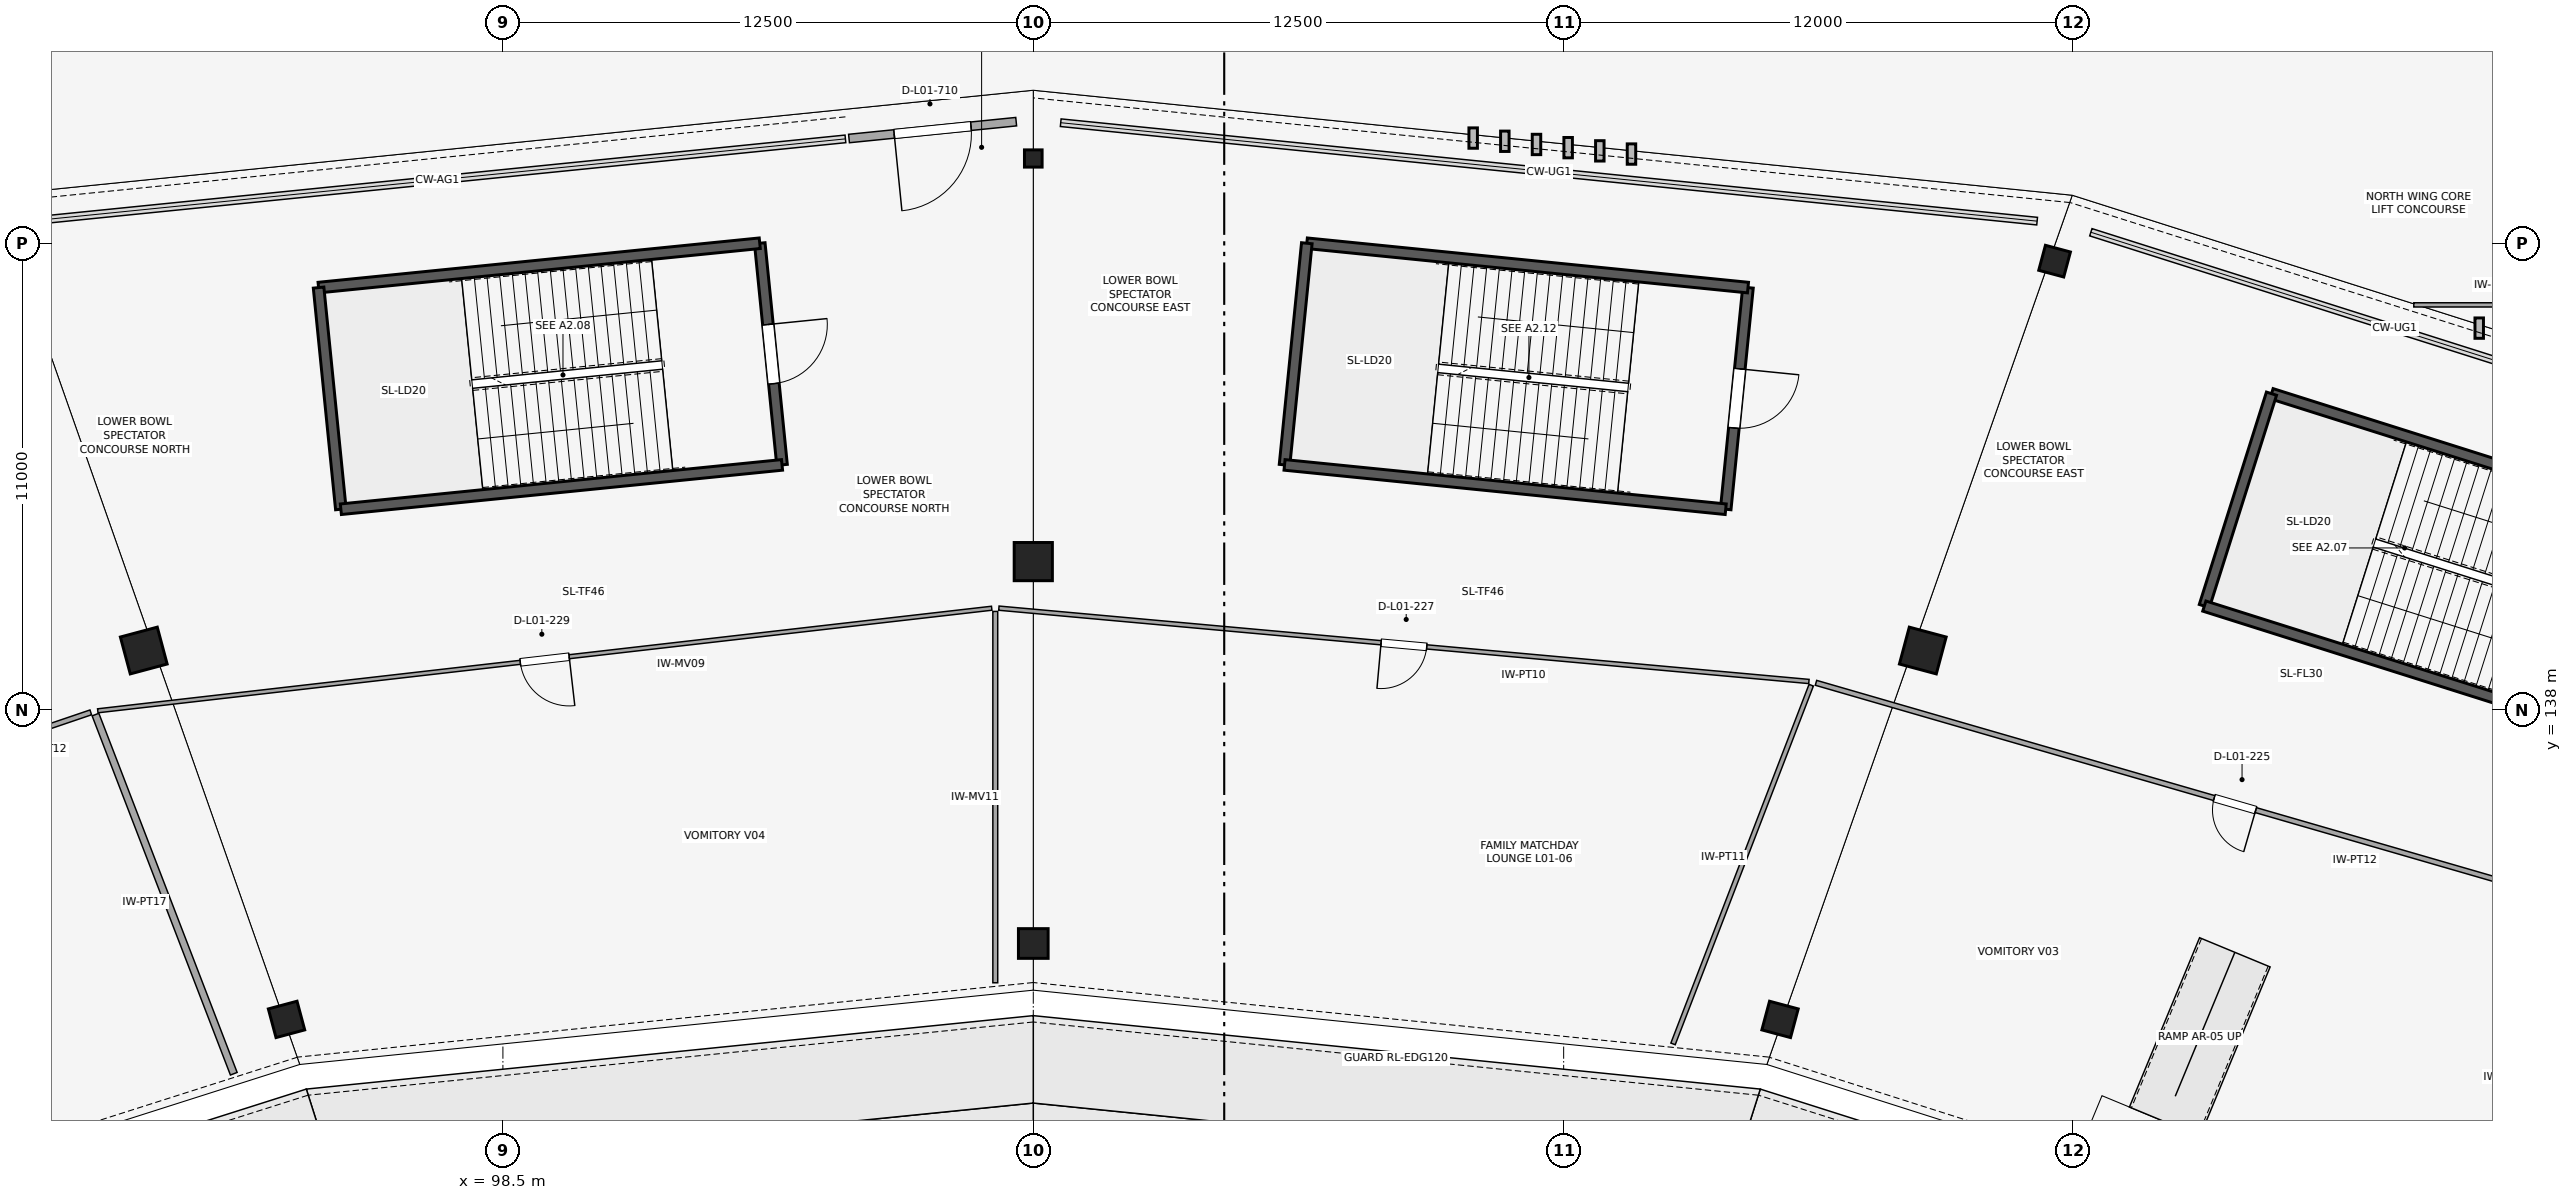
"""IFC4 building model, lengths in metres.
Left out: names, types, materials, properties, quantities, classifications, styles, units other than length and angle.
Written with IfcOpenShell. Run it as: python <this file> out.ifc"""

import sys

from ifc_helpers import new_model, si_unit, direction, frame, frame_2d, origin, origin_2d, place, context, subcontext, project, spatial, rectangle, hollow_circle, i_section, extrude, element, fill, save


model = new_model("IFC4")
c1 = context("Model", 3, precision=1e-05, world=origin(), true_north=direction((0.0, 1.0)))
c2 = subcontext(c1, "Body", "Model", "MODEL_VIEW")
j1 = project(units=[si_unit("LENGTHUNIT", "METRE"), si_unit("PLANEANGLEUNIT", "RADIAN")], contexts=[c1])
p1 = place(None, origin())
s1 = spatial("IfcSite", under=j1, at=p1, CompositionType="ELEMENT")
p2 = place(p1, origin())
s2 = spatial("IfcBuilding", under=s1, at=p2, CompositionType="ELEMENT")
p3 = place(p2, frame((0.0, 0.0, 5.4)))
s3 = spatial("IfcBuildingStorey", under=s2, at=p3, CompositionType="ELEMENT", Elevation=5.4)
for number, where, z_axis, x_axis in (
    (1, (128.6, 130.711, 0.0), (0.0, 0.0, 1.0), (0.259, 0.966, 0.0)),
    (2, (111.0, 132.5, 0.0), (0.0, 0.0, 1.0), (0.0, 1.0, 0.0)),
    (3, (93.4, 130.711, 0.0), (0.0, 0.0, 1.0), (-0.259, 0.966, 0.0)),
):
    element("IfcColumn", number, at=place(p3, frame(where, z_axis=z_axis, x_axis=x_axis)), inside=s3, PredefinedType="COLUMN", context=c2, shape_type="SweptSolid", body=[
        extrude(rectangle(XDim=0.7, YDim=0.7, at=origin_2d()), origin(), (0.0, 0.0, 1.0), 5.2),
    ])
p4 = place(p3, frame((131.964, 139.404, 0.0), z_axis=(0.0, 0.0, 1.0), x_axis=(0.258819045103, 0.965925826289, 0.0)))
e4 = element("IfcColumn", 4, at=p4, inside=s3, PredefinedType="COLUMN", context=c2, shape_type="SweptSolid", body=[
    extrude(rectangle(XDim=0.9, YDim=0.9, at=origin_2d()), origin(), (0.0, 0.0, 1.0), 5.2),
])
p5 = place(p3, frame((111.0, 141.5, 0.0), z_axis=(0.0, 0.0, 1.0), x_axis=(0.0, 1.0, 0.0)))
e5 = element("IfcColumn", 5, at=p5, inside=s3, PredefinedType="COLUMN", context=c2, shape_type="SweptSolid", body=[
    extrude(rectangle(XDim=0.9, YDim=0.9, at=origin_2d()), origin(), (0.0, 0.0, 1.0), 4.92),
])
p6 = place(p3, frame((90.036, 139.404, 0.0), z_axis=(0.0, 0.0, 1.0), x_axis=(-0.258819045103, 0.965925826289, 0.0)))
e6 = element("IfcColumn", 6, at=p6, inside=s3, PredefinedType="COLUMN", context=c2, shape_type="SweptSolid", body=[
    extrude(rectangle(XDim=0.9, YDim=0.9, at=origin_2d()), origin(), (0.0, 0.0, 1.0), 5.2),
])
p7 = place(p3, frame((135.07, 148.581, 0.0), z_axis=(0.0, 0.0, 1.0), x_axis=(0.258819045103, 0.965925826289, 0.0)))
e7 = element("IfcColumn", 7, at=p7, inside=s3, PredefinedType="COLUMN", context=c2, shape_type="SweptSolid", body=[
    extrude(hollow_circle(Radius=0.305, WallThickness=0.03, at=origin_2d()), origin(), (0.0, 0.0, 1.0), 5.2),
])
p8 = place(p3, frame((111.0, 151.0, 0.0), z_axis=(0.0, 0.0, 1.0), x_axis=(0.0, 1.0, 0.0)))
e8 = element("IfcColumn", 8, at=p8, inside=s3, PredefinedType="PILASTER", context=c2, shape_type="SweptSolid", body=[
    extrude(i_section(OverallWidth=0.406, OverallDepth=0.416, WebThickness=0.024, FlangeThickness=0.039, FilletRadius=0.015, at=origin_2d()), origin(), (0.0, 0.0, 1.0), 4.92),
])
p9 = place(p3, frame((150.146, 142.307, 0.0), z_axis=(0.0, 0.0, 1.0), x_axis=(-0.953461834254, 0.301513732061, 0.0)))
e9 = element("IfcWall", 9, at=p9, inside=s3, PredefinedType="SHEAR", context=c2, shape_type="SweptSolid", body=[
    extrude(rectangle(XDim=10.45, YDim=0.25, at=frame_2d((5.225, 0.0))), origin(), (0.0, 0.0, 1.0), 4.92),
])
p10 = place(p3, frame((140.182, 145.458, 0.0), z_axis=(0.0, 0.0, 1.0), x_axis=(-0.301485222482, -0.953470849384, 0.0)))
e10 = element("IfcWall", 10, at=p10, inside=s3, PredefinedType="SHEAR", context=c2, shape_type="SweptSolid", body=[
    extrude(rectangle(XDim=5.25, YDim=0.25, at=frame_2d((2.625, 0.0))), origin(), (0.0, 0.0, 1.0), 4.92),
])
p11 = place(p3, frame((138.6, 140.452, 0.0), z_axis=(0.0, 0.0, 1.0), x_axis=(0.953459710305, -0.301520448438, 0.0)))
e11 = element("IfcWall", 11, at=p11, inside=s3, PredefinedType="SHEAR", context=c2, shape_type="SweptSolid", body=[
    extrude(rectangle(XDim=10.45, YDim=0.25, at=frame_2d((5.225, 0.0))), origin(), (0.0, 0.0, 1.0), 4.92),
])
p12 = place(p3, frame((105.079, 143.779, 0.0), z_axis=(0.0, 0.0, 1.0), x_axis=(-0.100028593886, 0.994984562898, 0.0)))
e12 = element("IfcWall", 12, at=p12, inside=s3, PredefinedType="SHEAR", context=c2, shape_type="SweptSolid", body=[
    extrude(rectangle(XDim=5.25, YDim=0.25, at=frame_2d((2.625, 0.0))), origin(), (0.0, 0.0, 1.0), 4.92),
])
p13 = place(p12, frame((1.925, 0.0, 0.0)))
e13 = element("IfcOpeningElement", 13, at=p13, cuts=e12, PredefinedType="OPENING", context=c2, shape_type="SweptSolid", body=[
    extrude(rectangle(XDim=1.4, YDim=2.2, at=frame_2d((0.7, 1.1))), frame((0.0, 0.135, 0.0), z_axis=(0.0, -1.0, 0.0), x_axis=(1.0, 0.0, 0.0)), (0.0, 0.0, 1.0), 0.27),
])
p14 = place(p3, frame((104.553, 149.003, 0.0), z_axis=(0.0, 0.0, 1.0), x_axis=(-0.994985938948, -0.100014905366, 0.0)))
e14 = element("IfcWall", 14, at=p14, inside=s3, PredefinedType="SHEAR", context=c2, shape_type="SweptSolid", body=[
    extrude(rectangle(XDim=10.45, YDim=0.25, at=frame_2d((5.225, 0.0))), origin(), (0.0, 0.0, 1.0), 4.92),
])
p15 = place(p3, frame((94.156, 147.958, 0.0), z_axis=(0.0, 0.0, 1.0), x_axis=(0.100028593886, -0.994984562898, 0.0)))
e15 = element("IfcWall", 15, at=p15, inside=s3, PredefinedType="SHEAR", context=c2, shape_type="SweptSolid", body=[
    extrude(rectangle(XDim=5.25, YDim=0.25, at=frame_2d((2.625, 0.0))), origin(), (0.0, 0.0, 1.0), 4.92),
])
p16 = place(p3, frame((94.681, 142.734, 0.0), z_axis=(0.0, 0.0, 1.0), x_axis=(0.994985938948, 0.100014905366, 0.0)))
e16 = element("IfcWall", 16, at=p16, inside=s3, PredefinedType="SHEAR", context=c2, shape_type="SweptSolid", body=[
    extrude(rectangle(XDim=10.45, YDim=0.25, at=frame_2d((5.225, 0.0))), origin(), (0.0, 0.0, 1.0), 4.92),
])
p17 = place(p3, frame((127.319, 142.734, 0.0), z_axis=(0.0, 0.0, 1.0), x_axis=(0.10002396577, 0.994985028165, 0.0)))
e17 = element("IfcWall", 17, at=p17, inside=s3, PredefinedType="SHEAR", context=c2, shape_type="SweptSolid", body=[
    extrude(rectangle(XDim=5.25, YDim=0.25, at=frame_2d((2.625, 0.0))), origin(), (0.0, 0.0, 1.0), 4.92),
])
p18 = place(p17, frame((1.925, 0.0, 0.0)))
e18 = element("IfcOpeningElement", 18, at=p18, cuts=e17, PredefinedType="OPENING", context=c2, shape_type="SweptSolid", body=[
    extrude(rectangle(XDim=1.4, YDim=2.2, at=frame_2d((0.7, 1.1))), frame((0.0, 0.135, 0.0), z_axis=(0.0, -1.0, 0.0), x_axis=(1.0, 0.0, 0.0)), (0.0, 0.0, 1.0), 0.27),
])
p19 = place(p3, frame((127.844, 147.958, 0.0), z_axis=(0.0, 0.0, 1.0), x_axis=(-0.994988263568, 0.09999177647, 0.0)))
e19 = element("IfcWall", 19, at=p19, inside=s3, PredefinedType="SHEAR", context=c2, shape_type="SweptSolid", body=[
    extrude(rectangle(XDim=10.45, YDim=0.25, at=frame_2d((5.225, 0.0))), origin(), (0.0, 0.0, 1.0), 4.92),
])
p20 = place(p3, frame((117.447, 149.003, 0.0), z_axis=(0.0, 0.0, 1.0), x_axis=(-0.099982555566, -0.994989190184, 0.0)))
e20 = element("IfcWall", 20, at=p20, inside=s3, PredefinedType="SHEAR", context=c2, shape_type="SweptSolid", body=[
    extrude(rectangle(XDim=5.25, YDim=0.25, at=frame_2d((2.625, 0.0))), origin(), (0.0, 0.0, 1.0), 4.92),
])
p21 = place(p3, frame((116.922, 143.779, 0.0), z_axis=(0.0, 0.0, 1.0), x_axis=(0.994985705245, -0.100017230303, 0.0)))
e21 = element("IfcWall", 21, at=p21, inside=s3, PredefinedType="SHEAR", context=c2, shape_type="SweptSolid", body=[
    extrude(rectangle(XDim=10.45, YDim=0.25, at=frame_2d((5.225, 0.0))), origin(), (0.0, 0.0, 1.0), 4.92),
])
p22 = place(p3, frame((142.925, 125.252, 0.0), z_axis=(0.0, 0.0, 1.0), x_axis=(0.638797686135, 0.769374756662, 0.0)))
e22 = element("IfcWall", 22, at=p22, inside=s3, PredefinedType="PARTITIONING", context=c2, shape_type="SweptSolid", body=[
    extrude(rectangle(XDim=9.861, YDim=0.13, at=frame_2d((4.93, 0.0))), origin(), (0.0, 0.0, 1.0), 3.67),
])
p23 = place(p3, frame((149.197, 132.927, 0.0), z_axis=(0.0, 0.0, 1.0), x_axis=(-0.960580037239, 0.278003582815, 0.0)))
e23 = element("IfcWall", 23, at=p23, inside=s3, PredefinedType="PARTITIONING", context=c2, shape_type="SweptSolid", body=[
    extrude(rectangle(XDim=20.56, YDim=0.12, at=frame_2d((10.28, 0.0))), origin(), (0.0, 0.0, 1.0), 3.67),
])
p24 = place(p23, frame((9.77, 0.0, 0.0)))
e24 = element("IfcOpeningElement", 24, at=p24, cuts=e23, PredefinedType="OPENING", context=c2, shape_type="SweptSolid", body=[
    extrude(rectangle(XDim=1.02, YDim=2.1, at=frame_2d((0.51, 1.05))), frame((0.0, 0.07, 0.0), z_axis=(0.0, -1.0, 0.0), x_axis=(1.0, 0.0, 0.0)), (0.0, 0.0, 1.0), 0.14),
])
p25 = place(p3, frame((126.078, 130.134, 0.0), z_axis=(0.0, 0.0, 1.0), x_axis=(0.359493686517, 0.933147517467, 0.0)))
e25 = element("IfcWall", 25, at=p25, inside=s3, PredefinedType="PARTITIONING", context=c2, shape_type="SweptSolid", body=[
    extrude(rectangle(XDim=9.06, YDim=0.11, at=frame_2d((4.53, 0.0))), origin(), (0.0, 0.0, 1.0), 3.67),
])
p26 = place(p3, frame((129.281, 138.675, 0.0), z_axis=(0.0, 0.0, 1.0), x_axis=(-0.995927480172, 0.090157940512, 0.0)))
e26 = element("IfcWall", 26, at=p26, inside=s3, PredefinedType="PARTITIONING", context=c2, shape_type="SweptSolid", body=[
    extrude(rectangle(XDim=19.169, YDim=0.1, at=frame_2d((9.585, 0.0))), origin(), (0.0, 0.0, 1.0), 3.67),
])
p27 = place(p26, frame((9.045, 0.0, 0.0)))
e27 = element("IfcOpeningElement", 27, at=p27, cuts=e26, PredefinedType="OPENING", context=c2, shape_type="SweptSolid", body=[
    extrude(rectangle(XDim=1.08, YDim=2.24, at=frame_2d((0.54, 1.12))), frame((0.0, 0.06, 0.0), z_axis=(0.0, -1.0, 0.0), x_axis=(1.0, 0.0, 0.0)), (0.0, 0.0, 1.0), 0.12),
])
p28 = place(p3, frame((110.104, 131.574, 0.0), z_axis=(0.0, 0.0, 1.0), x_axis=(0.0, 1.0, 0.0)))
e28 = element("IfcWall", 28, at=p28, inside=s3, PredefinedType="MOVABLE", context=c2, shape_type="SweptSolid", body=[
    extrude(rectangle(XDim=8.751, YDim=0.115, at=frame_2d((4.376, 0.0))), origin(), (0.0, 0.0, 1.0), 3.67),
])
p29 = place(p3, frame((110.02, 140.401, 0.0), z_axis=(0.0, 0.0, 1.0), x_axis=(-0.993483598134, -0.113975173782, 0.0)))
e29 = element("IfcWall", 29, at=p29, inside=s3, PredefinedType="MOVABLE", context=c2, shape_type="SweptSolid", body=[
    extrude(rectangle(XDim=21.206, YDim=0.095, at=frame_2d((10.603, 0.0))), origin(), (0.0, 0.0, 1.0), 3.67),
])
p30 = place(p29, frame((10.023, 0.0, 0.0)))
e30 = element("IfcOpeningElement", 30, at=p30, cuts=e29, PredefinedType="OPENING", context=c2, shape_type="SweptSolid", body=[
    extrude(rectangle(XDim=1.16, YDim=2.1, at=frame_2d((0.58, 1.05))), frame((0.0, 0.057, 0.0), z_axis=(0.0, -1.0, 0.0), x_axis=(1.0, 0.0, 0.0)), (0.0, 0.0, 1.0), 0.115),
])
p31 = place(p3, frame((92.157, 129.431, 0.0), z_axis=(0.0, 0.0, 1.0), x_axis=(-0.359334404597, 0.933208864977, 0.0)))
e31 = element("IfcWall", 31, at=p31, inside=s3, PredefinedType="PARTITIONING", context=c2, shape_type="SweptSolid", body=[
    extrude(rectangle(XDim=9.07, YDim=0.17, at=frame_2d((4.535, 0.0))), origin(), (0.0, 0.0, 1.0), 3.67),
])
p32 = place(p3, frame((88.787, 137.947, 0.0), z_axis=(0.0, 0.0, 1.0), x_axis=(-0.946791416097, -0.321847812492, 0.0)))
e32 = element("IfcWall", 32, at=p32, inside=s3, PredefinedType="PARTITIONING", context=c2, shape_type="SweptSolid", body=[
    extrude(rectangle(XDim=2.63, YDim=0.12, at=frame_2d((1.315, 0.0))), origin(), (0.0, 0.0, 1.0), 3.67),
])
p33 = place(p3, frame((143.536, 147.55, 0.0), z_axis=(0.0, 0.0, 1.0), x_axis=(1.0, 0.0, 0.0)))
e33 = element("IfcWall", 33, at=p33, inside=s3, PredefinedType="PARTITIONING", context=c2, shape_type="SweptSolid", body=[
    extrude(rectangle(XDim=3.879, YDim=0.1, at=frame_2d((1.939, 0.0))), origin(), (0.0, 0.0, 1.0), 3.67),
])
p34 = place(p3, frame((110.597, 151.868, 0.0), z_axis=(0.0, 0.0, 1.0), x_axis=(-0.994956287752, -0.100309448517, 0.0)))
e34 = element("IfcWall", 34, at=p34, inside=s3, PredefinedType="PARTITIONING", context=c2, shape_type="SweptSolid", body=[
    extrude(rectangle(XDim=3.96, YDim=0.2, at=frame_2d((1.98, 0.0))), origin(), (0.0, 0.0, 1.0), 3.67),
])
p35 = place(p34, frame((1.07, 0.0, 0.0)))
e35 = element("IfcOpeningElement", 35, at=p35, cuts=e34, PredefinedType="OPENING", context=c2, shape_type="SweptSolid", body=[
    extrude(rectangle(XDim=1.82, YDim=2.38, at=frame_2d((0.91, 1.19))), frame((0.0, 0.11, 0.0), z_axis=(0.0, -1.0, 0.0), x_axis=(1.0, 0.0, 0.0)), (0.0, 0.0, 1.0), 0.22),
])
p36 = place(p13, frame((1.4, 0.0, 0.0), z_axis=(0.0, 0.0, 1.0), x_axis=(-1.0, 0.0, 0.0)))
e36 = element("IfcDoor", 36, at=p36, inside=s3, OperationType="SINGLE_SWING_LEFT", PredefinedType="DOOR", context=c2, shape_type="SweptSolid", body=[
    extrude(rectangle(XDim=1.4, YDim=2.2, at=frame_2d((0.7, 1.1))), frame((0.0, 0.025, 0.0), z_axis=(0.0, -1.0, 0.0), x_axis=(1.0, 0.0, 0.0)), (0.0, 0.0, 1.0), 0.05),
])
fill(e13, e36)
p37 = place(p18, frame((1.4, 0.0, 0.0), z_axis=(0.0, 0.0, 1.0), x_axis=(-1.0, 0.0, 0.0)))
e37 = element("IfcDoor", 37, at=p37, inside=s3, OperationType="SINGLE_SWING_LEFT", PredefinedType="DOOR", context=c2, shape_type="SweptSolid", body=[
    extrude(rectangle(XDim=1.4, YDim=2.2, at=frame_2d((0.7, 1.1))), frame((0.0, 0.025, 0.0), z_axis=(0.0, -1.0, 0.0), x_axis=(1.0, 0.0, 0.0)), (0.0, 0.0, 1.0), 0.05),
])
fill(e18, e37)
p38 = place(p24, origin())
e38 = element("IfcDoor", 38, at=p38, inside=s3, OperationType="SINGLE_SWING_LEFT", PredefinedType="DOOR", context=c2, shape_type="SweptSolid", body=[
    extrude(rectangle(XDim=1.02, YDim=2.1, at=frame_2d((0.51, 1.05))), frame((0.0, 0.025, 0.0), z_axis=(0.0, -1.0, 0.0), x_axis=(1.0, 0.0, 0.0)), (0.0, 0.0, 1.0), 0.05),
])
fill(e24, e38)
p39 = place(p27, origin())
e39 = element("IfcDoor", 39, at=p39, inside=s3, OperationType="SINGLE_SWING_RIGHT", PredefinedType="DOOR", context=c2, shape_type="SweptSolid", body=[
    extrude(rectangle(XDim=1.08, YDim=2.24, at=frame_2d((0.54, 1.12))), frame((0.0, 0.025, 0.0), z_axis=(0.0, -1.0, 0.0), x_axis=(1.0, 0.0, 0.0)), (0.0, 0.0, 1.0), 0.05),
])
fill(e27, e39)
p40 = place(p30, origin())
e40 = element("IfcDoor", 40, at=p40, inside=s3, OperationType="SINGLE_SWING_LEFT", PredefinedType="DOOR", context=c2, shape_type="SweptSolid", body=[
    extrude(rectangle(XDim=1.16, YDim=2.1, at=frame_2d((0.58, 1.05))), frame((0.0, 0.025, 0.0), z_axis=(0.0, -1.0, 0.0), x_axis=(1.0, 0.0, 0.0)), (0.0, 0.0, 1.0), 0.05),
])
fill(e30, e40)
p41 = place(p35, origin())
e41 = element("IfcDoor", 41, at=p41, inside=s3, OperationType="SINGLE_SWING_RIGHT", PredefinedType="DOOR", context=c2, shape_type="SweptSolid", body=[
    extrude(rectangle(XDim=1.82, YDim=2.38, at=frame_2d((0.91, 1.19))), frame((0.0, 0.025, 0.0), z_axis=(0.0, -1.0, 0.0), x_axis=(1.0, 0.0, 0.0)), (0.0, 0.0, 1.0), 0.05),
])
fill(e35, e41)
save(model, sys.argv[1])
